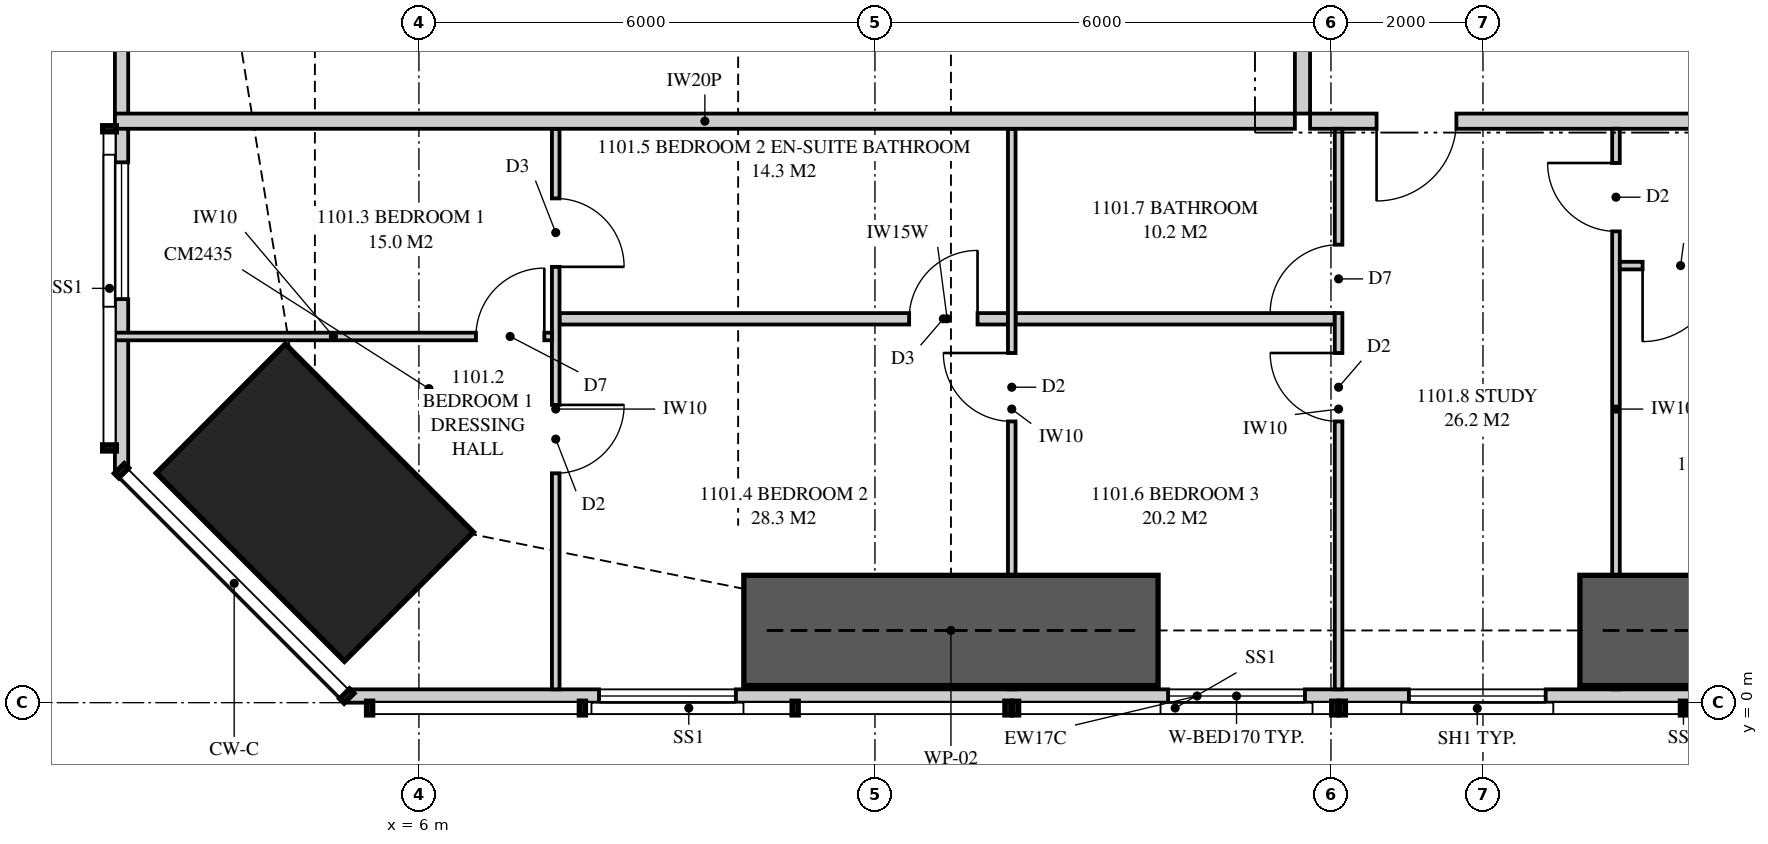
"""IFC4 building model, lengths in metres.
Left out: names, types, materials, properties, quantities, classifications, styles, units other than length and angle.
Written with IfcOpenShell. Run it as: python <this file> out.ifc"""

import sys

from ifc_helpers import new_model, si_unit, direction, frame, frame_2d, origin, origin_2d, place, context, subcontext, project, spatial, polyline, rectangle, outline, extrude, element, fill, save


model = new_model("IFC4")
c1 = context("Model", 3, precision=1e-05, world=origin(), true_north=direction((0.0, 1.0)))
c2 = subcontext(c1, "Body", "Model", "MODEL_VIEW")
j1 = project(units=[si_unit("LENGTHUNIT", "METRE"), si_unit("PLANEANGLEUNIT", "RADIAN")], contexts=[c1])
p1 = place(None, origin())
s1 = spatial("IfcSite", under=j1, at=p1, CompositionType="ELEMENT")
p2 = place(p1, origin())
s2 = spatial("IfcBuilding", under=s1, at=p2, CompositionType="ELEMENT")
p3 = place(p2, frame((0.0, 0.0, 44.45)))
s3 = spatial("IfcBuildingStorey", under=s2, at=p3, CompositionType="ELEMENT", Elevation=44.45)
p4 = place(p3, frame((4.631, 2.631, 0.0), z_axis=(0.0, 0.0, 1.0), x_axis=(0.707106781187, 0.707106781187, 0.0)))
e1 = element("IfcColumn", 1, at=p4, inside=s3, PredefinedType="COLUMN", context=c2, shape_type="SweptSolid", body=[
    extrude(rectangle(XDim=2.4, YDim=3.5, at=origin_2d()), origin(), (0.0, 0.0, 1.0), 3.35),
])
p5 = place(p3, frame((5.051, 0.087, 0.0), z_axis=(0.0, 0.0, 1.0), x_axis=(1.0, 0.0, 0.0)))
e2 = element("IfcWall", 2, at=p5, inside=s3, PredefinedType="SOLIDWALL", context=c2, shape_type="SweptSolid", body=[
    extrude(outline(polyline([(0.0, 0.0), (22.374, 0.0), (22.374, 2.15), (7.949, 2.15), (7.949, 3.11), (7.793, 3.11), (7.793, 2.15), (7.745, 2.15), (7.745, 3.11), (0.0, 3.11), (0.0, 0.0)])), frame((0.0, 0.087, 0.0), z_axis=(0.0, -1.0, 0.0), x_axis=(1.0, 0.0, 0.0)), (0.0, 0.0, 1.0), 0.175),
])
p6 = place(p5, frame((3.319, 0.0, 0.4)))
e3 = element("IfcOpeningElement", 3, at=p6, cuts=e2, PredefinedType="OPENING", context=c2, shape_type="SweptSolid", body=[
    extrude(rectangle(XDim=1.8, YDim=1.7, at=frame_2d((0.9, 0.85))), frame((0.0, 0.097, 0.0), z_axis=(0.0, -1.0, 0.0), x_axis=(1.0, 0.0, 0.0)), (0.0, 0.0, 1.0), 0.195),
])
p7 = place(p5, frame((10.806, 0.0, 0.4)))
e4 = element("IfcOpeningElement", 4, at=p7, cuts=e2, PredefinedType="OPENING", context=c2, shape_type="SweptSolid", body=[
    extrude(rectangle(XDim=1.8, YDim=1.7, at=frame_2d((0.9, 0.85))), frame((0.0, 0.097, 0.0), z_axis=(0.0, -1.0, 0.0), x_axis=(1.0, 0.0, 0.0)), (0.0, 0.0, 1.0), 0.195),
])
p8 = place(p5, frame((13.974, 0.0, 0.4)))
e5 = element("IfcOpeningElement", 5, at=p8, cuts=e2, PredefinedType="OPENING", context=c2, shape_type="SweptSolid", body=[
    extrude(rectangle(XDim=1.8, YDim=1.7, at=frame_2d((0.9, 0.85))), frame((0.0, 0.097, 0.0), z_axis=(0.0, -1.0, 0.0), x_axis=(1.0, 0.0, 0.0)), (0.0, 0.0, 1.0), 0.195),
])
p9 = place(p3, frame((2.087, 18.8, 0.0), z_axis=(0.0, 0.0, 1.0), x_axis=(0.0, -1.0, 0.0)))
e6 = element("IfcWall", 6, at=p9, inside=s3, PredefinedType="SOLIDWALL", context=c2, shape_type="SweptSolid", body=[
    extrude(outline(polyline([(0.0, 0.0), (15.749, 0.0), (15.749, 3.11), (6.019, 3.11), (6.019, 2.15), (5.926, 2.15), (5.926, 3.11), (5.8, 3.11), (5.8, 2.15), (0.0, 2.15), (0.0, 0.0)])), frame((0.0, 0.087, 0.0), z_axis=(0.0, -1.0, 0.0), x_axis=(1.0, 0.0, 0.0)), (0.0, 0.0, 1.0), 0.175),
])
p10 = place(p9, frame((0.95, 0.0, 0.4)))
e7 = element("IfcOpeningElement", 7, at=p10, cuts=e6, PredefinedType="OPENING", context=c2, shape_type="SweptSolid", body=[
    extrude(rectangle(XDim=1.8, YDim=1.7, at=frame_2d((0.9, 0.85))), frame((0.0, 0.097, 0.0), z_axis=(0.0, -1.0, 0.0), x_axis=(1.0, 0.0, 0.0)), (0.0, 0.0, 1.0), 0.195),
])
p11 = place(p9, frame((8.69, 0.0, 0.4)))
e8 = element("IfcOpeningElement", 8, at=p11, cuts=e6, PredefinedType="OPENING", context=c2, shape_type="SweptSolid", body=[
    extrude(rectangle(XDim=1.2, YDim=1.7, at=frame_2d((0.6, 0.85))), frame((0.0, 0.097, 0.0), z_axis=(0.0, -1.0, 0.0), x_axis=(1.0, 0.0, 0.0)), (0.0, 0.0, 1.0), 0.195),
])
p12 = place(p9, frame((11.691, 0.0, 0.4)))
e9 = element("IfcOpeningElement", 9, at=p12, cuts=e6, PredefinedType="OPENING", context=c2, shape_type="SweptSolid", body=[
    extrude(rectangle(XDim=1.8, YDim=1.7, at=frame_2d((0.9, 0.85))), frame((0.0, 0.097, 0.0), z_axis=(0.0, -1.0, 0.0), x_axis=(1.0, 0.0, 0.0)), (0.0, 0.0, 1.0), 0.195),
])
p13 = place(p3, frame((17.725, 7.65, 0.0), z_axis=(0.0, 0.0, 1.0), x_axis=(1.0, 0.0, 0.0)))
e10 = element("IfcWall", 10, at=p13, inside=s3, PredefinedType="PARTITIONING", context=c2, shape_type="SweptSolid", body=[
    extrude(outline(polyline([(0.0, 0.0), (18.375, 0.0), (18.375, 3.11), (17.612, 3.11), (17.612, 2.541), (16.938, 2.541), (16.938, 3.11), (6.612, 3.11), (6.612, 2.541), (5.938, 2.541), (5.938, 3.11), (0.0, 3.11), (0.0, 0.0)])), frame((0.0, 0.1, 0.0), z_axis=(0.0, -1.0, 0.0), x_axis=(1.0, 0.0, 0.0)), (0.0, 0.0, 1.0), 0.2),
])
p14 = place(p13, frame((0.875, 0.0, 0.0)))
e11 = element("IfcOpeningElement", 11, at=p14, cuts=e10, PredefinedType="OPENING", context=c2, shape_type="SweptSolid", body=[
    extrude(rectangle(XDim=1.05, YDim=2.2, at=frame_2d((0.525, 1.1))), frame((0.0, 0.11, 0.0), z_axis=(0.0, -1.0, 0.0), x_axis=(1.0, 0.0, 0.0)), (0.0, 0.0, 1.0), 0.22),
])
p15 = place(p3, frame((7.8, 0.175, 0.0), z_axis=(0.0, 0.0, 1.0), x_axis=(0.0, 1.0, 0.0)))
e12 = element("IfcWall", 12, at=p15, inside=s3, PredefinedType="PARTITIONING", context=c2, shape_type="SweptSolid", body=[
    extrude(outline(polyline([(0.0, 0.0), (7.375, 0.0), (7.375, 3.11), (2.697, 3.11), (2.697, 2.15), (0.943, 2.15), (0.943, 3.11), (0.0, 3.11), (0.0, 0.0)])), frame((0.0, 0.05, 0.0), z_axis=(0.0, -1.0, 0.0), x_axis=(1.0, 0.0, 0.0)), (0.0, 0.0, 1.0), 0.1),
])
p16 = place(p15, frame((2.842, 0.0, 0.0)))
e13 = element("IfcOpeningElement", 13, at=p16, cuts=e12, PredefinedType="OPENING", context=c2, shape_type="SweptSolid", body=[
    extrude(rectangle(XDim=0.9, YDim=2.1, at=frame_2d((0.45, 1.05))), frame((0.0, 0.06, 0.0), z_axis=(0.0, -1.0, 0.0), x_axis=(1.0, 0.0, 0.0)), (0.0, 0.0, 1.0), 0.12),
])
p17 = place(p15, frame((5.559, 0.0, 0.0)))
e14 = element("IfcOpeningElement", 14, at=p17, cuts=e12, PredefinedType="OPENING", context=c2, shape_type="SweptSolid", body=[
    extrude(rectangle(XDim=0.9, YDim=2.1, at=frame_2d((0.45, 1.05))), frame((0.0, 0.06, 0.0), z_axis=(0.0, -1.0, 0.0), x_axis=(1.0, 0.0, 0.0)), (0.0, 0.0, 1.0), 0.12),
])
p18 = place(p3, frame((13.8, 0.175, 0.0), z_axis=(0.0, 0.0, 1.0), x_axis=(0.0, 1.0, 0.0)))
e15 = element("IfcWall", 15, at=p18, inside=s3, PredefinedType="PARTITIONING", context=c2, shape_type="SweptSolid", body=[
    extrude(outline(polyline([(1.635, 2.15), (0.0, 2.15), (0.0, 0.0), (7.375, 0.0), (7.375, 3.11), (1.635, 3.11), (1.635, 2.15)]), holes=[polyline([(1.021, 0.126), (0.529, 0.126), (0.529, 0.919), (1.021, 0.919), (1.021, 0.126)]), polyline([(1.021, 1.231), (0.529, 1.231), (0.529, 2.024), (1.021, 2.024), (1.021, 1.231)])]), frame((0.0, 0.05, 0.0), z_axis=(0.0, -1.0, 0.0), x_axis=(1.0, 0.0, 0.0)), (0.0, 0.0, 1.0), 0.1),
])
p19 = place(p18, frame((3.525, 0.0, 0.0)))
e16 = element("IfcOpeningElement", 16, at=p19, cuts=e15, PredefinedType="OPENING", context=c2, shape_type="SweptSolid", body=[
    extrude(rectangle(XDim=0.9, YDim=2.1, at=frame_2d((0.45, 1.05))), frame((0.0, 0.06, 0.0), z_axis=(0.0, -1.0, 0.0), x_axis=(1.0, 0.0, 0.0)), (0.0, 0.0, 1.0), 0.12),
])
p20 = place(p3, frame((18.1, 0.175, 0.0), z_axis=(0.0, 0.0, 1.0), x_axis=(0.0, 1.0, 0.0)))
e17 = element("IfcWall", 17, at=p20, inside=s3, PredefinedType="PARTITIONING", context=c2, shape_type="SweptSolid", body=[
    extrude(outline(polyline([(0.0, 0.0), (7.375, 0.0), (7.375, 3.11), (1.635, 3.11), (1.635, 2.15), (0.0, 2.15), (0.0, 3.11), (0.0, 0.0)])), frame((0.0, 0.05, 0.0), z_axis=(0.0, -1.0, 0.0), x_axis=(1.0, 0.0, 0.0)), (0.0, 0.0, 1.0), 0.1),
])
p21 = place(p20, frame((3.525, 0.0, 0.0)))
e18 = element("IfcOpeningElement", 18, at=p21, cuts=e17, PredefinedType="OPENING", context=c2, shape_type="SweptSolid", body=[
    extrude(rectangle(XDim=0.9, YDim=2.1, at=frame_2d((0.45, 1.05))), frame((0.0, 0.06, 0.0), z_axis=(0.0, -1.0, 0.0), x_axis=(1.0, 0.0, 0.0)), (0.0, 0.0, 1.0), 0.12),
])
p22 = place(p20, frame((4.95, 0.0, 0.0)))
e19 = element("IfcOpeningElement", 19, at=p22, cuts=e17, PredefinedType="OPENING", context=c2, shape_type="SweptSolid", body=[
    extrude(rectangle(XDim=0.9, YDim=2.1, at=frame_2d((0.45, 1.05))), frame((0.0, 0.06, 0.0), z_axis=(0.0, -1.0, 0.0), x_axis=(1.0, 0.0, 0.0)), (0.0, 0.0, 1.0), 0.12),
])
p23 = place(p3, frame((2.0, 4.817, 0.0), z_axis=(0.0, 0.0, 1.0), x_axis=(1.0, 0.0, 0.0)))
e20 = element("IfcWall", 20, at=p23, inside=s3, PredefinedType="PARTITIONING", context=c2, shape_type="SweptSolid", body=[
    extrude(outline(polyline([(0.0, 0.0), (5.75, 0.0), (5.75, 3.11), (3.148, 3.11), (3.148, 2.15), (1.406, 2.15), (1.406, 3.11), (0.0, 3.11), (0.0, 0.0)])), frame((0.0, 0.05, 0.0), z_axis=(0.0, -1.0, 0.0), x_axis=(1.0, 0.0, 0.0)), (0.0, 0.0, 1.0), 0.1),
])
p24 = place(p23, frame((4.75, 0.0, 0.0)))
e21 = element("IfcOpeningElement", 21, at=p24, cuts=e20, PredefinedType="OPENING", context=c2, shape_type="SweptSolid", body=[
    extrude(rectangle(XDim=0.9, YDim=2.1, at=frame_2d((0.45, 1.05))), frame((0.0, 0.06, 0.0), z_axis=(0.0, -1.0, 0.0), x_axis=(1.0, 0.0, 0.0)), (0.0, 0.0, 1.0), 0.12),
])
p25 = place(p3, frame((7.85, 5.05, 0.0), z_axis=(0.0, 0.0, 1.0), x_axis=(1.0, 0.0, 0.0)))
e22 = element("IfcWall", 22, at=p25, inside=s3, PredefinedType="PLUMBINGWALL", context=c2, shape_type="SweptSolid", body=[
    extrude(outline(polyline([(0.0, 0.0), (5.9, 0.0), (5.9, 3.11), (5.462, 3.11), (5.462, 2.541), (4.838, 2.541), (4.838, 3.11), (3.635, 3.11), (3.635, 2.51), (1.065, 2.51), (1.065, 3.11), (0.0, 3.11), (0.0, 0.0)])), frame((0.0, 0.075, 0.0), z_axis=(0.0, -1.0, 0.0), x_axis=(1.0, 0.0, 0.0)), (0.0, 0.0, 1.0), 0.15),
])
p26 = place(p25, frame((4.6, 0.0, 0.0)))
e23 = element("IfcOpeningElement", 23, at=p26, cuts=e22, PredefinedType="OPENING", context=c2, shape_type="SweptSolid", body=[
    extrude(rectangle(XDim=0.9, YDim=2.1, at=frame_2d((0.45, 1.05))), frame((0.0, 0.085, 0.0), z_axis=(0.0, -1.0, 0.0), x_axis=(1.0, 0.0, 0.0)), (0.0, 0.0, 1.0), 0.17),
])
p27 = place(p3, frame((13.85, 5.05, 0.0), z_axis=(0.0, 0.0, 1.0), x_axis=(1.0, 0.0, 0.0)))
e24 = element("IfcWall", 24, at=p27, inside=s3, PredefinedType="PLUMBINGWALL", context=c2, shape_type="SweptSolid", body=[
    extrude(rectangle(XDim=4.2, YDim=0.15, at=frame_2d((2.1, 0.0))), origin(), (0.0, 0.0, 1.0), 3.11),
])
p28 = place(p3, frame((21.75, 0.175, 0.0), z_axis=(0.0, 0.0, 1.0), x_axis=(0.0, 1.0, 0.0)))
e25 = element("IfcWall", 25, at=p28, inside=s3, PredefinedType="PARTITIONING", context=c2, shape_type="SweptSolid", body=[
    extrude(outline(polyline([(0.0, 0.0), (7.375, 0.0), (7.375, 3.11), (1.635, 3.11), (1.635, 2.15), (0.0, 2.15), (0.0, 3.11), (0.0, 0.0)])), frame((0.0, 0.05, 0.0), z_axis=(0.0, -1.0, 0.0), x_axis=(1.0, 0.0, 0.0)), (0.0, 0.0, 1.0), 0.1),
])
p29 = place(p28, frame((6.025, 0.0, 0.0)))
e26 = element("IfcOpeningElement", 26, at=p29, cuts=e25, PredefinedType="OPENING", context=c2, shape_type="SweptSolid", body=[
    extrude(rectangle(XDim=0.9, YDim=2.1, at=frame_2d((0.45, 1.05))), frame((0.0, 0.06, 0.0), z_axis=(0.0, -1.0, 0.0), x_axis=(1.0, 0.0, 0.0)), (0.0, 0.0, 1.0), 0.12),
])
p30 = place(p3, frame((21.8, 5.75, 0.0), z_axis=(0.0, 0.0, 1.0), x_axis=(1.0, 0.0, 0.0)))
e27 = element("IfcWall", 27, at=p30, inside=s3, PredefinedType="PARTITIONING", context=c2, shape_type="SweptSolid", body=[
    extrude(outline(polyline([(0.0, 0.0), (10.65, 0.0), (10.65, 3.11), (2.487, 3.11), (2.487, 2.541), (1.913, 2.541), (1.913, 3.11), (0.0, 3.11), (0.0, 0.0)])), frame((0.0, 0.05, 0.0), z_axis=(0.0, -1.0, 0.0), x_axis=(1.0, 0.0, 0.0)), (0.0, 0.0, 1.0), 0.1),
])
p31 = place(p30, frame((0.3, 0.0, 0.0)))
e28 = element("IfcOpeningElement", 28, at=p31, cuts=e27, PredefinedType="OPENING", context=c2, shape_type="SweptSolid", body=[
    extrude(rectangle(XDim=1.0, YDim=2.1, at=frame_2d((0.5, 1.05))), frame((0.0, 0.06, 0.0), z_axis=(0.0, -1.0, 0.0), x_axis=(1.0, 0.0, 0.0)), (0.0, 0.0, 1.0), 0.12),
])
p32 = place(p3, frame((2.0, 7.65, 0.0), z_axis=(0.0, 0.0, 1.0), x_axis=(1.0, 0.0, 0.0)))
e29 = element("IfcWall", 29, at=p32, inside=s3, PredefinedType="PARTITIONING", context=c2, shape_type="SweptSolid", body=[
    extrude(outline(polyline([(0.0, 0.0), (15.525, 0.0), (15.525, 3.11), (11.337, 3.11), (11.337, 2.541), (10.663, 2.541), (10.663, 3.11), (9.51, 3.11), (9.51, 2.51), (6.89, 2.51), (6.89, 3.11), (2.969, 3.11), (2.969, 2.541), (2.74, 2.541), (2.74, 2.15), (0.896, 2.15), (0.896, 3.11), (0.0, 3.11), (0.0, 0.0)])), frame((0.0, 0.1, 0.0), z_axis=(0.0, -1.0, 0.0), x_axis=(1.0, 0.0, 0.0)), (0.0, 0.0, 1.0), 0.2),
])
p33 = place(p3, frame((17.625, 7.75, 0.0), z_axis=(0.0, 0.0, 1.0), x_axis=(0.0, 1.0, 0.0)))
e30 = element("IfcWall", 30, at=p33, inside=s3, PredefinedType="PARTITIONING", context=c2, shape_type="SweptSolid", body=[
    extrude(rectangle(XDim=1.45, YDim=0.2, at=frame_2d((0.725, 0.0))), origin(), (0.0, 0.0, 1.0), 3.11),
])
for number, where, z_axis, x_axis in (
    (31, (10.275, 0.95, 0.0), (0.0, 0.0, 1.0), (1.0, 0.0, 0.0)),
    (32, (21.275, 0.95, 0.0), (0.0, 0.0, 1.0), (1.0, 0.0, 0.0)),
):
    element("IfcWall", number, at=place(p3, frame(where, z_axis=z_axis, x_axis=x_axis)), inside=s3, PredefinedType="SHEAR", context=c2, shape_type="SweptSolid", body=[
        extrude(rectangle(XDim=5.45, YDim=1.45, at=frame_2d((2.725, 0.0))), origin(), (0.0, 0.0, 1.0), 3.35),
    ])
p34 = place(p6, origin())
e33 = element("IfcWindow", 33, at=p34, inside=s3, PartitioningType="SINGLE_PANEL", PredefinedType="WINDOW", context=c2, shape_type="SweptSolid", body=[
    extrude(rectangle(XDim=1.8, YDim=1.7, at=frame_2d((0.9, 0.85))), frame((0.0, 0.03, 0.0), z_axis=(0.0, -1.0, 0.0), x_axis=(1.0, 0.0, 0.0)), (0.0, 0.0, 1.0), 0.06),
])
fill(e3, e33)
p35 = place(p7, origin())
e34 = element("IfcWindow", 34, at=p35, inside=s3, PartitioningType="SINGLE_PANEL", PredefinedType="WINDOW", context=c2, shape_type="SweptSolid", body=[
    extrude(rectangle(XDim=1.8, YDim=1.7, at=frame_2d((0.9, 0.85))), frame((0.0, 0.03, 0.0), z_axis=(0.0, -1.0, 0.0), x_axis=(1.0, 0.0, 0.0)), (0.0, 0.0, 1.0), 0.06),
])
fill(e4, e34)
p36 = place(p8, origin())
e35 = element("IfcWindow", 35, at=p36, inside=s3, PartitioningType="SINGLE_PANEL", PredefinedType="WINDOW", context=c2, shape_type="SweptSolid", body=[
    extrude(rectangle(XDim=1.8, YDim=1.7, at=frame_2d((0.9, 0.85))), frame((0.0, 0.03, 0.0), z_axis=(0.0, -1.0, 0.0), x_axis=(1.0, 0.0, 0.0)), (0.0, 0.0, 1.0), 0.06),
])
fill(e5, e35)
p37 = place(p12, origin())
e36 = element("IfcWindow", 36, at=p37, inside=s3, PartitioningType="SINGLE_PANEL", PredefinedType="WINDOW", context=c2, shape_type="SweptSolid", body=[
    extrude(rectangle(XDim=1.8, YDim=1.7, at=frame_2d((0.9, 0.85))), frame((0.0, 0.03, 0.0), z_axis=(0.0, -1.0, 0.0), x_axis=(1.0, 0.0, 0.0)), (0.0, 0.0, 1.0), 0.06),
])
fill(e9, e36)
p38 = place(p14, frame((1.05, 0.0, 0.0), z_axis=(0.0, 0.0, 1.0), x_axis=(-1.0, 0.0, 0.0)))
e37 = element("IfcDoor", 37, at=p38, inside=s3, OperationType="SINGLE_SWING_RIGHT", PredefinedType="DOOR", context=c2, shape_type="SweptSolid", body=[
    extrude(rectangle(XDim=1.05, YDim=2.2, at=frame_2d((0.525, 1.1))), frame((0.0, 0.025, 0.0), z_axis=(0.0, -1.0, 0.0), x_axis=(1.0, 0.0, 0.0)), (0.0, 0.0, 1.0), 0.05),
])
fill(e11, e37)
p39 = place(p24, origin())
e38 = element("IfcDoor", 38, at=p39, inside=s3, OperationType="SINGLE_SWING_RIGHT", PredefinedType="DOOR", context=c2, shape_type="SweptSolid", body=[
    extrude(rectangle(XDim=0.9, YDim=2.1, at=frame_2d((0.45, 1.05))), frame((0.0, 0.025, 0.0), z_axis=(0.0, -1.0, 0.0), x_axis=(1.0, 0.0, 0.0)), (0.0, 0.0, 1.0), 0.05),
])
fill(e21, e38)
p40 = place(p16, frame((0.9, 0.0, 0.0), z_axis=(0.0, 0.0, 1.0), x_axis=(-1.0, 0.0, 0.0)))
e39 = element("IfcDoor", 39, at=p40, inside=s3, OperationType="SINGLE_SWING_LEFT", PredefinedType="DOOR", context=c2, shape_type="SweptSolid", body=[
    extrude(rectangle(XDim=0.9, YDim=2.1, at=frame_2d((0.45, 1.05))), frame((0.0, 0.025, 0.0), z_axis=(0.0, -1.0, 0.0), x_axis=(1.0, 0.0, 0.0)), (0.0, 0.0, 1.0), 0.05),
])
fill(e13, e39)
p41 = place(p19, origin())
e40 = element("IfcDoor", 40, at=p41, inside=s3, OperationType="SINGLE_SWING_RIGHT", PredefinedType="DOOR", context=c2, shape_type="SweptSolid", body=[
    extrude(rectangle(XDim=0.9, YDim=2.1, at=frame_2d((0.45, 1.05))), frame((0.0, 0.025, 0.0), z_axis=(0.0, -1.0, 0.0), x_axis=(1.0, 0.0, 0.0)), (0.0, 0.0, 1.0), 0.05),
])
fill(e16, e40)
p42 = place(p26, origin())
e41 = element("IfcDoor", 41, at=p42, inside=s3, OperationType="SINGLE_SWING_RIGHT", PredefinedType="DOOR", context=c2, shape_type="SweptSolid", body=[
    extrude(rectangle(XDim=0.9, YDim=2.1, at=frame_2d((0.45, 1.05))), frame((0.0, 0.025, 0.0), z_axis=(0.0, -1.0, 0.0), x_axis=(1.0, 0.0, 0.0)), (0.0, 0.0, 1.0), 0.05),
])
fill(e23, e41)
p43 = place(p21, origin())
e42 = element("IfcDoor", 42, at=p43, inside=s3, OperationType="SINGLE_SWING_RIGHT", PredefinedType="DOOR", context=c2, shape_type="SweptSolid", body=[
    extrude(rectangle(XDim=0.9, YDim=2.1, at=frame_2d((0.45, 1.05))), frame((0.0, 0.025, 0.0), z_axis=(0.0, -1.0, 0.0), x_axis=(1.0, 0.0, 0.0)), (0.0, 0.0, 1.0), 0.05),
])
fill(e18, e42)
p44 = place(p22, origin())
e43 = element("IfcDoor", 43, at=p44, inside=s3, OperationType="SINGLE_SWING_LEFT", PredefinedType="DOOR", context=c2, shape_type="SweptSolid", body=[
    extrude(rectangle(XDim=0.9, YDim=2.1, at=frame_2d((0.45, 1.05))), frame((0.0, 0.025, 0.0), z_axis=(0.0, -1.0, 0.0), x_axis=(1.0, 0.0, 0.0)), (0.0, 0.0, 1.0), 0.05),
])
fill(e19, e43)
p45 = place(p17, frame((0.9, 0.0, 0.0), z_axis=(0.0, 0.0, 1.0), x_axis=(-1.0, 0.0, 0.0)))
e44 = element("IfcDoor", 44, at=p45, inside=s3, OperationType="SINGLE_SWING_RIGHT", PredefinedType="DOOR", context=c2, shape_type="SweptSolid", body=[
    extrude(rectangle(XDim=0.9, YDim=2.1, at=frame_2d((0.45, 1.05))), frame((0.0, 0.025, 0.0), z_axis=(0.0, -1.0, 0.0), x_axis=(1.0, 0.0, 0.0)), (0.0, 0.0, 1.0), 0.05),
])
fill(e14, e44)
p46 = place(p29, origin())
e45 = element("IfcDoor", 45, at=p46, inside=s3, OperationType="SINGLE_SWING_RIGHT", PredefinedType="DOOR", context=c2, shape_type="SweptSolid", body=[
    extrude(rectangle(XDim=0.9, YDim=2.1, at=frame_2d((0.45, 1.05))), frame((0.0, 0.025, 0.0), z_axis=(0.0, -1.0, 0.0), x_axis=(1.0, 0.0, 0.0)), (0.0, 0.0, 1.0), 0.05),
])
fill(e26, e45)
p47 = place(p31, frame((1.0, 0.0, 0.0), z_axis=(0.0, 0.0, 1.0), x_axis=(-1.0, 0.0, 0.0)))
e46 = element("IfcDoor", 46, at=p47, inside=s3, OperationType="SINGLE_SWING_RIGHT", PredefinedType="DOOR", context=c2, shape_type="SweptSolid", body=[
    extrude(rectangle(XDim=1.0, YDim=2.1, at=frame_2d((0.5, 1.05))), frame((0.0, 0.025, 0.0), z_axis=(0.0, -1.0, 0.0), x_axis=(1.0, 0.0, 0.0)), (0.0, 0.0, 1.0), 0.05),
])
fill(e28, e46)
save(model, sys.argv[1])
